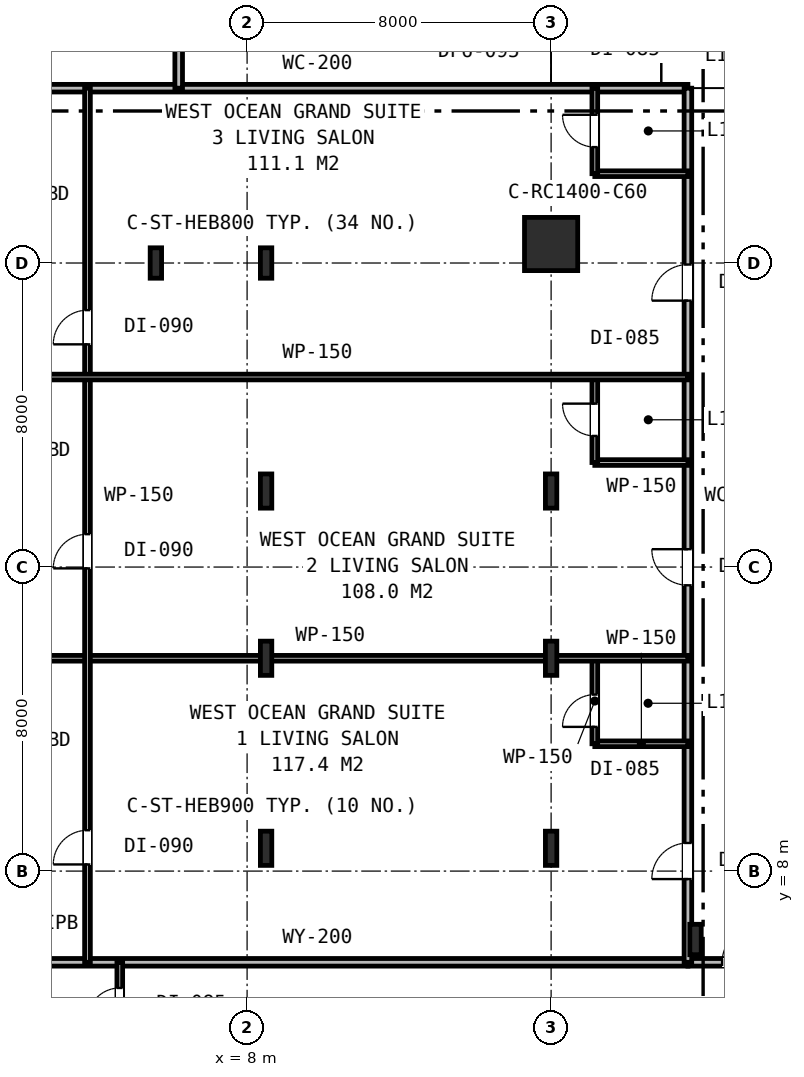
"""IFC4 building model, lengths in metres.
Left out: names, types, materials, properties, quantities, classifications, styles, units other than length and angle.
Written with IfcOpenShell. Run it as: python <this file> out.ifc"""

import sys

from ifc_helpers import new_model, si_unit, direction, frame, frame_2d, origin, origin_2d, place, context, subcontext, project, spatial, rectangle, i_section, extrude, element, fill, save


model = new_model("IFC4")
c1 = context("Model", 3, precision=1e-05, world=origin(), true_north=direction((0.0, 1.0)))
c2 = subcontext(c1, "Body", "Model", "MODEL_VIEW")
j1 = project(units=[si_unit("LENGTHUNIT", "METRE"), si_unit("PLANEANGLEUNIT", "RADIAN")], contexts=[c1])
p1 = place(None, origin())
s1 = spatial("IfcSite", under=j1, at=p1, CompositionType="ELEMENT")
p2 = place(p1, origin())
s2 = spatial("IfcBuilding", under=s1, at=p2, CompositionType="ELEMENT")
p3 = place(p2, frame((0.0, 0.0, 51.0)))
s3 = spatial("IfcBuildingStorey", under=s2, at=p3, CompositionType="ELEMENT", Elevation=51.0)
p4 = place(p3, frame((8.5, 24.0, 0.0), z_axis=(0.0, 0.0, 1.0), x_axis=(1.0, 0.0, 0.0)))
e1 = element("IfcColumn", 1, at=p4, inside=s3, PredefinedType="COLUMN", context=c2, shape_type="SweptSolid", body=[
    extrude(i_section(OverallWidth=0.3, OverallDepth=0.8, WebThickness=0.018, FlangeThickness=0.033, FilletRadius=0.03, at=origin_2d()), origin(), (0.0, 0.0, 1.0), 3.6),
])
p5 = place(p3, frame((16.0, 24.5, 0.0), z_axis=(0.0, 0.0, 1.0), x_axis=(1.0, 0.0, 0.0)))
e2 = element("IfcColumn", 2, at=p5, inside=s3, PredefinedType="COLUMN", context=c2, shape_type="SweptSolid", body=[
    extrude(rectangle(XDim=1.4, YDim=1.4, at=origin_2d()), origin(), (0.0, 0.0, 1.0), 3.6),
])
for number, where, z_axis, x_axis in (
    (3, (5.6, 24.0, 0.0), (0.0, 0.0, 1.0), (1.0, 0.0, 0.0)),
    (4, (19.8, 6.2, 0.0), (0.0, 0.0, 1.0), (1.0, 0.0, 0.0)),
):
    element("IfcColumn", number, at=place(p3, frame(where, z_axis=z_axis, x_axis=x_axis)), inside=s3, PredefinedType="COLUMN", context=c2, shape_type="SweptSolid", body=[
        extrude(i_section(OverallWidth=0.3, OverallDepth=0.8, WebThickness=0.018, FlangeThickness=0.033, FilletRadius=0.03, at=origin_2d()), origin(), (0.0, 0.0, 1.0), 3.6),
    ])
for number, where, z_axis, x_axis in (
    (5, (8.5, 8.6, 0.0), (0.0, 0.0, 1.0), (1.0, 0.0, 0.0)),
    (6, (16.0, 8.6, 0.0), (0.0, 0.0, 1.0), (1.0, 0.0, 0.0)),
    (7, (8.5, 13.6, 0.0), (0.0, 0.0, 1.0), (1.0, 0.0, 0.0)),
    (8, (16.0, 13.6, 0.0), (0.0, 0.0, 1.0), (1.0, 0.0, 0.0)),
    (9, (8.5, 18.0, 0.0), (0.0, 0.0, 1.0), (1.0, 0.0, 0.0)),
    (10, (16.0, 18.0, 0.0), (0.0, 0.0, 1.0), (1.0, 0.0, 0.0)),
):
    element("IfcColumn", number, at=place(p3, frame(where, z_axis=z_axis, x_axis=x_axis)), inside=s3, PredefinedType="COLUMN", context=c2, shape_type="SweptSolid", body=[
        extrude(i_section(OverallWidth=0.3, OverallDepth=0.9, WebThickness=0.018, FlangeThickness=0.035, FilletRadius=0.03, at=origin_2d()), origin(), (0.0, 0.0, 1.0), 3.6),
    ])
p6 = place(p3, frame((0.1, 28.6, 0.0), z_axis=(0.0, 0.0, 1.0), x_axis=(1.0, 0.0, 0.0)))
e11 = element("IfcWall", 11, at=p6, inside=s3, PredefinedType="PARTITIONING", context=c2, shape_type="SweptSolid", body=[
    extrude(rectangle(XDim=19.5, YDim=0.2, at=frame_2d((9.75, 0.0))), origin(), (0.0, 0.0, 1.0), 2.82),
])
p7 = place(p3, frame((6.2, 28.6, 0.0), z_axis=(0.0, 0.0, 1.0), x_axis=(0.0, 1.0, 0.0)))
e12 = element("IfcWall", 12, at=p7, inside=s3, PredefinedType="PARTITIONING", context=c2, shape_type="SweptSolid", body=[
    extrude(rectangle(XDim=12.4, YDim=0.2, at=frame_2d((6.2, 0.0))), origin(), (0.0, 0.0, 1.0), 2.82),
])
p8 = place(p7, frame((3.725, 0.0, 0.0)))
e13 = element("IfcOpeningElement", 13, at=p8, cuts=e12, PredefinedType="OPENING", context=c2, shape_type="SweptSolid", body=[
    extrude(rectangle(XDim=0.95, YDim=2.15, at=frame_2d((0.475, 1.075))), frame((0.0, 0.11, 0.0), z_axis=(0.0, -1.0, 0.0), x_axis=(1.0, 0.0, 0.0)), (0.0, 0.0, 1.0), 0.22),
])
p9 = place(p7, frame((8.381, 0.0, 0.0)))
e14 = element("IfcOpeningElement", 14, at=p9, cuts=e12, PredefinedType="OPENING", context=c2, shape_type="SweptSolid", body=[
    extrude(rectangle(XDim=0.95, YDim=2.15, at=frame_2d((0.475, 1.075))), frame((0.0, 0.11, 0.0), z_axis=(0.0, -1.0, 0.0), x_axis=(1.0, 0.0, 0.0)), (0.0, 0.0, 1.0), 0.22),
])
p10 = place(p3, frame((0.1, 5.6, 0.0), z_axis=(0.0, 0.0, 1.0), x_axis=(1.0, 0.0, 0.0)))
e15 = element("IfcWall", 15, at=p10, inside=s3, PredefinedType="PARTITIONING", context=c2, shape_type="SweptSolid", body=[
    extrude(rectangle(XDim=19.5, YDim=0.2, at=frame_2d((9.75, 0.0))), origin(), (0.0, 0.0, 1.0), 2.82),
])
p11 = place(p3, frame((19.6, 5.6, 0.0), z_axis=(0.0, 0.0, 1.0), x_axis=(1.0, 0.0, 0.0)))
e16 = element("IfcWall", 16, at=p11, inside=s3, PredefinedType="PARTITIONING", context=c2, shape_type="SweptSolid", body=[
    extrude(rectangle(XDim=2.2, YDim=0.2, at=frame_2d((1.1, 0.0))), origin(), (0.0, 0.0, 1.0), 3.33),
])
p12 = place(p11, frame((0.9, 0.0, 0.0)))
e17 = element("IfcOpeningElement", 17, at=p12, cuts=e16, PredefinedType="OPENING", context=c2, shape_type="SweptSolid", body=[
    extrude(rectangle(XDim=0.95, YDim=2.15, at=frame_2d((0.475, 1.075))), frame((0.0, 0.11, 0.0), z_axis=(0.0, -1.0, 0.0), x_axis=(1.0, 0.0, 0.0)), (0.0, 0.0, 1.0), 0.22),
])
p13 = place(p3, frame((4.65, 3.4, 0.0), z_axis=(0.0, 0.0, 1.0), x_axis=(0.0, 1.0, 0.0)))
e18 = element("IfcWall", 18, at=p13, inside=s3, PredefinedType="PARTITIONING", context=c2, shape_type="SweptSolid", body=[
    extrude(rectangle(XDim=2.2, YDim=0.15, at=frame_2d((1.1, 0.0))), origin(), (0.0, 0.0, 1.0), 3.33),
])
p14 = place(p13, frame((0.675, 0.0, 0.0)))
e19 = element("IfcOpeningElement", 19, at=p14, cuts=e18, PredefinedType="OPENING", context=c2, shape_type="SweptSolid", body=[
    extrude(rectangle(XDim=0.85, YDim=2.15, at=frame_2d((0.425, 1.075))), frame((0.0, 0.085, 0.0), z_axis=(0.0, -1.0, 0.0), x_axis=(1.0, 0.0, 0.0)), (0.0, 0.0, 1.0), 0.17),
])
p15 = place(p3, frame((19.6, 5.6, 0.0), z_axis=(0.0, 0.0, 1.0), x_axis=(0.0, 1.0, 0.0)))
e20 = element("IfcWall", 20, at=p15, inside=s3, PredefinedType="PARTITIONING", context=c2, shape_type="SweptSolid", body=[
    extrude(rectangle(XDim=23.0, YDim=0.2, at=frame_2d((11.5, 0.0))), origin(), (0.0, 0.0, 1.0), 2.82),
])
p16 = place(p15, frame((2.19, 0.0, 0.0)))
e21 = element("IfcOpeningElement", 21, at=p16, cuts=e20, PredefinedType="OPENING", context=c2, shape_type="SweptSolid", body=[
    extrude(rectangle(XDim=0.95, YDim=2.15, at=frame_2d((0.475, 1.075))), frame((0.0, 0.11, 0.0), z_axis=(0.0, -1.0, 0.0), x_axis=(1.0, 0.0, 0.0)), (0.0, 0.0, 1.0), 0.22),
])
p17 = place(p15, frame((9.92, 0.0, 0.0)))
e22 = element("IfcOpeningElement", 22, at=p17, cuts=e20, PredefinedType="OPENING", context=c2, shape_type="SweptSolid", body=[
    extrude(rectangle(XDim=0.95, YDim=2.15, at=frame_2d((0.475, 1.075))), frame((0.0, 0.11, 0.0), z_axis=(0.0, -1.0, 0.0), x_axis=(1.0, 0.0, 0.0)), (0.0, 0.0, 1.0), 0.22),
])
p18 = place(p15, frame((17.41, 0.0, 0.0)))
e23 = element("IfcOpeningElement", 23, at=p18, cuts=e20, PredefinedType="OPENING", context=c2, shape_type="SweptSolid", body=[
    extrude(rectangle(XDim=0.95, YDim=2.15, at=frame_2d((0.475, 1.075))), frame((0.0, 0.11, 0.0), z_axis=(0.0, -1.0, 0.0), x_axis=(1.0, 0.0, 0.0)), (0.0, 0.0, 1.0), 0.22),
])
p19 = place(p3, frame((17.15, 11.35, 0.0), z_axis=(0.0, 0.0, 1.0), x_axis=(1.0, 0.0, 0.0)))
e24 = element("IfcWall", 24, at=p19, inside=s3, PredefinedType="PARTITIONING", context=c2, shape_type="SweptSolid", body=[
    extrude(rectangle(XDim=2.45, YDim=0.15, at=frame_2d((1.225, 0.0))), origin(), (0.0, 0.0, 1.0), 2.96),
])
p20 = place(p3, frame((17.15, 11.35, 0.0), z_axis=(0.0, 0.0, 1.0), x_axis=(0.0, 1.0, 0.0)))
e25 = element("IfcWall", 25, at=p20, inside=s3, PredefinedType="PARTITIONING", context=c2, shape_type="SweptSolid", body=[
    extrude(rectangle(XDim=2.25, YDim=0.15, at=frame_2d((1.125, 0.0))), origin(), (0.0, 0.0, 1.0), 2.82),
])
p21 = place(p20, frame((0.444, 0.0, 0.0)))
e26 = element("IfcOpeningElement", 26, at=p21, cuts=e25, PredefinedType="OPENING", context=c2, shape_type="SweptSolid", body=[
    extrude(rectangle(XDim=0.85, YDim=2.15, at=frame_2d((0.425, 1.075))), frame((0.0, 0.085, 0.0), z_axis=(0.0, -1.0, 0.0), x_axis=(1.0, 0.0, 0.0)), (0.0, 0.0, 1.0), 0.17),
])
p22 = place(p3, frame((0.1, 13.6, 0.0), z_axis=(0.0, 0.0, 1.0), x_axis=(1.0, 0.0, 0.0)))
e27 = element("IfcWall", 27, at=p22, inside=s3, PredefinedType="PARTITIONING", context=c2, shape_type="SweptSolid", body=[
    extrude(rectangle(XDim=19.5, YDim=0.15, at=frame_2d((9.75, 0.0))), origin(), (0.0, 0.0, 1.0), 2.82),
])
p23 = place(p3, frame((3.8, 5.6, 0.0), z_axis=(0.0, 0.0, 1.0), x_axis=(0.0, 1.0, 0.0)))
e28 = element("IfcWall", 28, at=p23, inside=s3, PredefinedType="PARTITIONING", context=c2, shape_type="SweptSolid", body=[
    extrude(rectangle(XDim=23.0, YDim=0.15, at=frame_2d((11.5, 0.0))), origin(), (0.0, 0.0, 1.0), 2.82),
])
p24 = place(p23, frame((2.575, 0.0, 0.0)))
e29 = element("IfcOpeningElement", 29, at=p24, cuts=e28, PredefinedType="OPENING", context=c2, shape_type="SweptSolid", body=[
    extrude(rectangle(XDim=0.9, YDim=2.15, at=frame_2d((0.45, 1.075))), frame((0.0, 0.085, 0.0), z_axis=(0.0, -1.0, 0.0), x_axis=(1.0, 0.0, 0.0)), (0.0, 0.0, 1.0), 0.17),
])
p25 = place(p23, frame((10.365, 0.0, 0.0)))
e30 = element("IfcOpeningElement", 30, at=p25, cuts=e28, PredefinedType="OPENING", context=c2, shape_type="SweptSolid", body=[
    extrude(rectangle(XDim=0.9, YDim=2.15, at=frame_2d((0.45, 1.075))), frame((0.0, 0.085, 0.0), z_axis=(0.0, -1.0, 0.0), x_axis=(1.0, 0.0, 0.0)), (0.0, 0.0, 1.0), 0.17),
])
p26 = place(p23, frame((16.26, 0.0, 0.0)))
e31 = element("IfcOpeningElement", 31, at=p26, cuts=e28, PredefinedType="OPENING", context=c2, shape_type="SweptSolid", body=[
    extrude(rectangle(XDim=0.9, YDim=2.15, at=frame_2d((0.45, 1.075))), frame((0.0, 0.085, 0.0), z_axis=(0.0, -1.0, 0.0), x_axis=(1.0, 0.0, 0.0)), (0.0, 0.0, 1.0), 0.17),
])
p27 = place(p3, frame((17.15, 18.75, 0.0), z_axis=(0.0, 0.0, 1.0), x_axis=(1.0, 0.0, 0.0)))
e32 = element("IfcWall", 32, at=p27, inside=s3, PredefinedType="PARTITIONING", context=c2, shape_type="SweptSolid", body=[
    extrude(rectangle(XDim=2.45, YDim=0.15, at=frame_2d((1.225, 0.0))), origin(), (0.0, 0.0, 1.0), 3.33),
])
p28 = place(p3, frame((17.15, 18.75, 0.0), z_axis=(0.0, 0.0, 1.0), x_axis=(0.0, 1.0, 0.0)))
e33 = element("IfcWall", 33, at=p28, inside=s3, PredefinedType="PARTITIONING", context=c2, shape_type="SweptSolid", body=[
    extrude(rectangle(XDim=2.25, YDim=0.15, at=frame_2d((1.125, 0.0))), origin(), (0.0, 0.0, 1.0), 3.33),
])
p29 = place(p28, frame((0.7, 0.0, 0.0)))
e34 = element("IfcOpeningElement", 34, at=p29, cuts=e33, PredefinedType="OPENING", context=c2, shape_type="SweptSolid", body=[
    extrude(rectangle(XDim=0.85, YDim=2.15, at=frame_2d((0.425, 1.075))), frame((0.0, 0.085, 0.0), z_axis=(0.0, -1.0, 0.0), x_axis=(1.0, 0.0, 0.0)), (0.0, 0.0, 1.0), 0.17),
])
p30 = place(p3, frame((0.1, 21.0, 0.0), z_axis=(0.0, 0.0, 1.0), x_axis=(1.0, 0.0, 0.0)))
e35 = element("IfcWall", 35, at=p30, inside=s3, PredefinedType="PARTITIONING", context=c2, shape_type="SweptSolid", body=[
    extrude(rectangle(XDim=19.5, YDim=0.15, at=frame_2d((9.75, 0.0))), origin(), (0.0, 0.0, 1.0), 2.82),
])
p31 = place(p3, frame((17.15, 26.35, 0.0), z_axis=(0.0, 0.0, 1.0), x_axis=(1.0, 0.0, 0.0)))
e36 = element("IfcWall", 36, at=p31, inside=s3, PredefinedType="PARTITIONING", context=c2, shape_type="SweptSolid", body=[
    extrude(rectangle(XDim=2.45, YDim=0.15, at=frame_2d((1.225, 0.0))), origin(), (0.0, 0.0, 1.0), 2.96),
])
p32 = place(p3, frame((17.15, 26.35, 0.0), z_axis=(0.0, 0.0, 1.0), x_axis=(0.0, 1.0, 0.0)))
e37 = element("IfcWall", 37, at=p32, inside=s3, PredefinedType="PARTITIONING", context=c2, shape_type="SweptSolid", body=[
    extrude(rectangle(XDim=2.25, YDim=0.15, at=frame_2d((1.125, 0.0))), origin(), (0.0, 0.0, 1.0), 3.33),
])
p33 = place(p32, frame((0.7, 0.0, 0.0)))
e38 = element("IfcOpeningElement", 38, at=p33, cuts=e37, PredefinedType="OPENING", context=c2, shape_type="SweptSolid", body=[
    extrude(rectangle(XDim=0.85, YDim=2.15, at=frame_2d((0.425, 1.075))), frame((0.0, 0.085, 0.0), z_axis=(0.0, -1.0, 0.0), x_axis=(1.0, 0.0, 0.0)), (0.0, 0.0, 1.0), 0.17),
])
p34 = place(p12, origin())
e39 = element("IfcDoor", 39, at=p34, inside=s3, OperationType="SINGLE_SWING_RIGHT", PredefinedType="DOOR", context=c2, shape_type="SweptSolid", body=[
    extrude(rectangle(XDim=0.95, YDim=2.15, at=frame_2d((0.475, 1.075))), frame((0.0, 0.025, 0.0), z_axis=(0.0, -1.0, 0.0), x_axis=(1.0, 0.0, 0.0)), (0.0, 0.0, 1.0), 0.05),
])
fill(e17, e39)
p35 = place(p14, origin())
e40 = element("IfcDoor", 40, at=p35, inside=s3, OperationType="SINGLE_SWING_LEFT", PredefinedType="DOOR", context=c2, shape_type="SweptSolid", body=[
    extrude(rectangle(XDim=0.85, YDim=2.15, at=frame_2d((0.425, 1.075))), frame((0.0, 0.025, 0.0), z_axis=(0.0, -1.0, 0.0), x_axis=(1.0, 0.0, 0.0)), (0.0, 0.0, 1.0), 0.05),
])
fill(e19, e40)
p36 = place(p16, origin())
e41 = element("IfcDoor", 41, at=p36, inside=s3, OperationType="SINGLE_SWING_LEFT", PredefinedType="DOOR", context=c2, shape_type="SweptSolid", body=[
    extrude(rectangle(XDim=0.95, YDim=2.15, at=frame_2d((0.475, 1.075))), frame((0.0, 0.025, 0.0), z_axis=(0.0, -1.0, 0.0), x_axis=(1.0, 0.0, 0.0)), (0.0, 0.0, 1.0), 0.05),
])
fill(e21, e41)
p37 = place(p21, origin())
e42 = element("IfcDoor", 42, at=p37, inside=s3, OperationType="SINGLE_SWING_LEFT", PredefinedType="DOOR", context=c2, shape_type="SweptSolid", body=[
    extrude(rectangle(XDim=0.85, YDim=2.15, at=frame_2d((0.425, 1.075))), frame((0.0, 0.025, 0.0), z_axis=(0.0, -1.0, 0.0), x_axis=(1.0, 0.0, 0.0)), (0.0, 0.0, 1.0), 0.05),
])
fill(e26, e42)
p38 = place(p24, origin())
e43 = element("IfcDoor", 43, at=p38, inside=s3, OperationType="SINGLE_SWING_LEFT", PredefinedType="DOOR", context=c2, shape_type="SweptSolid", body=[
    extrude(rectangle(XDim=0.9, YDim=2.15, at=frame_2d((0.45, 1.075))), frame((0.0, 0.025, 0.0), z_axis=(0.0, -1.0, 0.0), x_axis=(1.0, 0.0, 0.0)), (0.0, 0.0, 1.0), 0.05),
])
fill(e29, e43)
p39 = place(p17, origin())
e44 = element("IfcDoor", 44, at=p39, inside=s3, OperationType="SINGLE_SWING_RIGHT", PredefinedType="DOOR", context=c2, shape_type="SweptSolid", body=[
    extrude(rectangle(XDim=0.95, YDim=2.15, at=frame_2d((0.475, 1.075))), frame((0.0, 0.025, 0.0), z_axis=(0.0, -1.0, 0.0), x_axis=(1.0, 0.0, 0.0)), (0.0, 0.0, 1.0), 0.05),
])
fill(e22, e44)
p40 = place(p29, origin())
e45 = element("IfcDoor", 45, at=p40, inside=s3, OperationType="SINGLE_SWING_RIGHT", PredefinedType="DOOR", context=c2, shape_type="SweptSolid", body=[
    extrude(rectangle(XDim=0.85, YDim=2.15, at=frame_2d((0.425, 1.075))), frame((0.0, 0.025, 0.0), z_axis=(0.0, -1.0, 0.0), x_axis=(1.0, 0.0, 0.0)), (0.0, 0.0, 1.0), 0.05),
])
fill(e34, e45)
p41 = place(p25, origin())
e46 = element("IfcDoor", 46, at=p41, inside=s3, OperationType="SINGLE_SWING_LEFT", PredefinedType="DOOR", context=c2, shape_type="SweptSolid", body=[
    extrude(rectangle(XDim=0.9, YDim=2.15, at=frame_2d((0.45, 1.075))), frame((0.0, 0.025, 0.0), z_axis=(0.0, -1.0, 0.0), x_axis=(1.0, 0.0, 0.0)), (0.0, 0.0, 1.0), 0.05),
])
fill(e30, e46)
p42 = place(p18, origin())
e47 = element("IfcDoor", 47, at=p42, inside=s3, OperationType="SINGLE_SWING_LEFT", PredefinedType="DOOR", context=c2, shape_type="SweptSolid", body=[
    extrude(rectangle(XDim=0.95, YDim=2.15, at=frame_2d((0.475, 1.075))), frame((0.0, 0.025, 0.0), z_axis=(0.0, -1.0, 0.0), x_axis=(1.0, 0.0, 0.0)), (0.0, 0.0, 1.0), 0.05),
])
fill(e23, e47)
p43 = place(p33, origin())
e48 = element("IfcDoor", 48, at=p43, inside=s3, OperationType="SINGLE_SWING_RIGHT", PredefinedType="DOOR", context=c2, shape_type="SweptSolid", body=[
    extrude(rectangle(XDim=0.85, YDim=2.15, at=frame_2d((0.425, 1.075))), frame((0.0, 0.025, 0.0), z_axis=(0.0, -1.0, 0.0), x_axis=(1.0, 0.0, 0.0)), (0.0, 0.0, 1.0), 0.05),
])
fill(e38, e48)
p44 = place(p26, origin())
e49 = element("IfcDoor", 49, at=p44, inside=s3, OperationType="SINGLE_SWING_LEFT", PredefinedType="DOOR", context=c2, shape_type="SweptSolid", body=[
    extrude(rectangle(XDim=0.9, YDim=2.15, at=frame_2d((0.45, 1.075))), frame((0.0, 0.025, 0.0), z_axis=(0.0, -1.0, 0.0), x_axis=(1.0, 0.0, 0.0)), (0.0, 0.0, 1.0), 0.05),
])
fill(e31, e49)
save(model, sys.argv[1])
